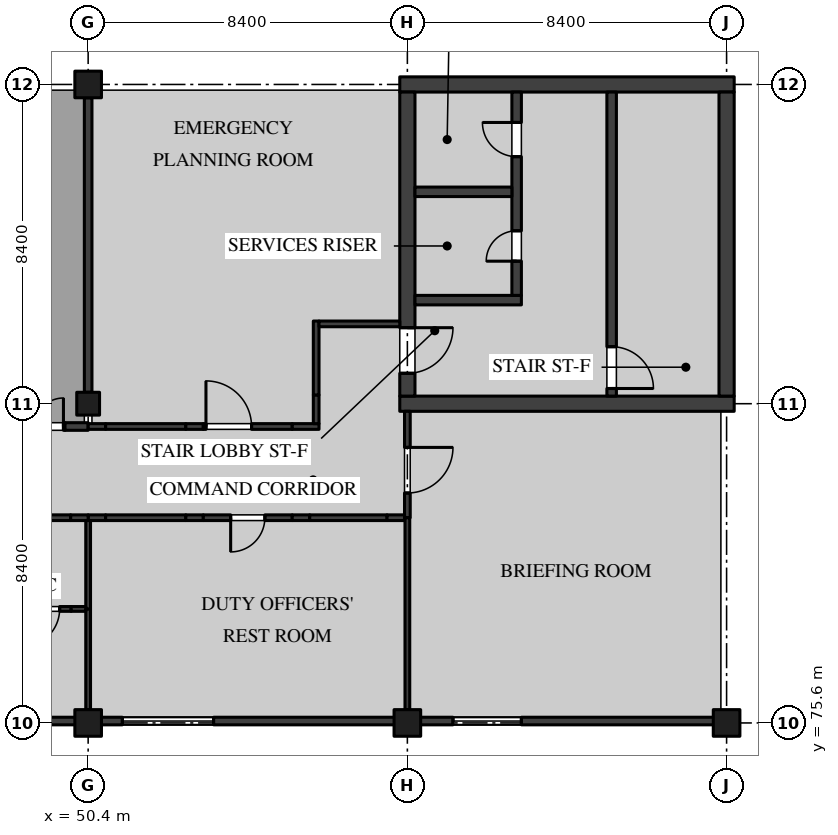
"""IFC4 building model, lengths in metres.
Left out: names, types, materials, properties, quantities, classifications, styles, units other than length and angle.
Written with IfcOpenShell. Run it as: python <this file> out.ifc"""

import sys

from ifc_helpers import new_model, si_unit, direction, frame, frame_2d, origin, origin_2d, place, context, subcontext, project, spatial, rectangle, extrude, element, fill, save


model = new_model("IFC4")
c1 = context("Model", 3, precision=1e-05, world=origin(), true_north=direction((0.0, 1.0)))
c2 = subcontext(c1, "Body", "Model", "MODEL_VIEW")
j1 = project(units=[si_unit("LENGTHUNIT", "METRE"), si_unit("PLANEANGLEUNIT", "RADIAN")], contexts=[c1])
p1 = place(None, origin())
s1 = spatial("IfcSite", under=j1, at=p1, CompositionType="ELEMENT")
p2 = place(p1, origin())
s2 = spatial("IfcBuilding", under=s1, at=p2, CompositionType="ELEMENT")
p3 = place(p2, frame((0.0, 0.0, 5.4)))
s3 = spatial("IfcBuildingStorey", under=s2, at=p3, CompositionType="ELEMENT", Elevation=5.4)
p4 = place(p3, frame((50.4, 75.6, 0.0), z_axis=(0.0, 0.0, 1.0), x_axis=(1.0, 0.0, 0.0)))
e1 = element("IfcColumn", 1, at=p4, inside=s3, PredefinedType="COLUMN", context=c2, shape_type="SweptSolid", body=[
    extrude(rectangle(XDim=0.7, YDim=0.7, at=origin_2d()), origin(), (0.0, 0.0, 1.0), 4.37),
])
p5 = place(p3, frame((50.4, 84.0, 0.0), z_axis=(0.0, 0.0, 1.0), x_axis=(1.0, 0.0, 0.0)))
e2 = element("IfcColumn", 2, at=p5, inside=s3, PredefinedType="COLUMN", context=c2, shape_type="SweptSolid", body=[
    extrude(rectangle(XDim=0.6, YDim=0.6, at=origin_2d()), origin(), (0.0, 0.0, 1.0), 4.37),
])
for number, where, z_axis, x_axis in (
    (3, (50.4, 92.4, 0.0), (0.0, 0.0, 1.0), (1.0, 0.0, 0.0)),
    (4, (58.8, 75.6, 0.0), (0.0, 0.0, 1.0), (1.0, 0.0, 0.0)),
    (5, (67.2, 75.6, 0.0), (0.0, 0.0, 1.0), (1.0, 0.0, 0.0)),
):
    element("IfcColumn", number, at=place(p3, frame(where, z_axis=z_axis, x_axis=x_axis)), inside=s3, PredefinedType="COLUMN", context=c2, shape_type="SweptSolid", body=[
        extrude(rectangle(XDim=0.7, YDim=0.7, at=origin_2d()), origin(), (0.0, 0.0, 1.0), 4.37),
    ])
for number, where, z_axis, x_axis in (
    (6, (58.6, 84.0, 0.0), (0.0, 0.0, 1.0), (1.0, 0.0, 0.0)),
    (7, (58.6, 92.4, 0.0), (0.0, 0.0, 1.0), (1.0, 0.0, 0.0)),
):
    element("IfcWall", number, at=place(p3, frame(where, z_axis=z_axis, x_axis=x_axis)), inside=s3, PredefinedType="SHEAR", context=c2, shape_type="SweptSolid", body=[
        extrude(rectangle(XDim=8.8, YDim=0.4, at=frame_2d((4.4, 0.0))), origin(), (0.0, 0.0, 1.0), 4.37),
    ])
p6 = place(p3, frame((58.8, 84.2, 0.0), z_axis=(0.0, 0.0, 1.0), x_axis=(0.0, 1.0, 0.0)))
e8 = element("IfcWall", 8, at=p6, inside=s3, PredefinedType="SHEAR", context=c2, shape_type="SweptSolid", body=[
    extrude(rectangle(XDim=8.0, YDim=0.4, at=frame_2d((4.0, 0.0))), origin(), (0.0, 0.0, 1.0), 4.37),
])
p7 = place(p6, frame((0.6, 0.0, 0.0)))
e9 = element("IfcOpeningElement", 9, at=p7, cuts=e8, PredefinedType="OPENING", context=c2, shape_type="SweptSolid", body=[
    extrude(rectangle(XDim=1.2, YDim=2.1, at=frame_2d((0.6, 1.05))), frame((0.0, 0.21, 0.0), z_axis=(0.0, -1.0, 0.0), x_axis=(1.0, 0.0, 0.0)), (0.0, 0.0, 1.0), 0.42),
])
p8 = place(p3, frame((67.2, 84.2, 0.0), z_axis=(0.0, 0.0, 1.0), x_axis=(0.0, 1.0, 0.0)))
e10 = element("IfcWall", 10, at=p8, inside=s3, PredefinedType="SHEAR", context=c2, shape_type="SweptSolid", body=[
    extrude(rectangle(XDim=8.0, YDim=0.4, at=frame_2d((4.0, 0.0))), origin(), (0.0, 0.0, 1.0), 4.37),
])
p9 = place(p3, frame((64.175, 84.2, 0.0), z_axis=(0.0, 0.0, 1.0), x_axis=(0.0, 1.0, 0.0)))
e11 = element("IfcWall", 11, at=p9, inside=s3, PredefinedType="SOLIDWALL", context=c2, shape_type="SweptSolid", body=[
    extrude(rectangle(XDim=8.0, YDim=0.25, at=frame_2d((4.0, 0.0))), origin(), (0.0, 0.0, 1.0), 4.37),
])
p10 = place(p9, frame((0.2, 0.0, 0.0)))
e12 = element("IfcOpeningElement", 12, at=p10, cuts=e11, PredefinedType="OPENING", context=c2, shape_type="SweptSolid", body=[
    extrude(rectangle(XDim=1.1, YDim=2.1, at=frame_2d((0.55, 1.05))), frame((0.0, 0.135, 0.0), z_axis=(0.0, -1.0, 0.0), x_axis=(1.0, 0.0, 0.0)), (0.0, 0.0, 1.0), 0.27),
])
p11 = place(p3, frame((61.8, 86.725, 0.0), z_axis=(0.0, 0.0, 1.0), x_axis=(-1.0, 0.0, 0.0)))
e13 = element("IfcWall", 13, at=p11, inside=s3, PredefinedType="SOLIDWALL", context=c2, shape_type="SweptSolid", body=[
    extrude(rectangle(XDim=2.8, YDim=0.25, at=frame_2d((1.4, 0.0))), origin(), (0.0, 0.0, 1.0), 4.37),
])
p12 = place(p3, frame((61.675, 86.85, 0.0), z_axis=(0.0, 0.0, 1.0), x_axis=(0.0, 1.0, 0.0)))
e14 = element("IfcWall", 14, at=p12, inside=s3, PredefinedType="SOLIDWALL", context=c2, shape_type="SweptSolid", body=[
    extrude(rectangle(XDim=5.35, YDim=0.25, at=frame_2d((2.675, 0.0))), origin(), (0.0, 0.0, 1.0), 4.37),
])
p13 = place(p12, frame((3.65, 0.0, 0.0)))
e15 = element("IfcOpeningElement", 15, at=p13, cuts=e14, PredefinedType="OPENING", context=c2, shape_type="SweptSolid", body=[
    extrude(rectangle(XDim=0.9, YDim=2.1, at=frame_2d((0.45, 1.05))), frame((0.0, 0.135, 0.0), z_axis=(0.0, -1.0, 0.0), x_axis=(1.0, 0.0, 0.0)), (0.0, 0.0, 1.0), 0.27),
])
p14 = place(p12, frame((0.9, 0.0, 0.0)))
e16 = element("IfcOpeningElement", 16, at=p14, cuts=e14, PredefinedType="OPENING", context=c2, shape_type="SweptSolid", body=[
    extrude(rectangle(XDim=0.8, YDim=2.1, at=frame_2d((0.4, 1.05))), frame((0.0, 0.135, 0.0), z_axis=(0.0, -1.0, 0.0), x_axis=(1.0, 0.0, 0.0)), (0.0, 0.0, 1.0), 0.27),
])
p15 = place(p3, frame((61.55, 89.575, 0.0), z_axis=(0.0, 0.0, 1.0), x_axis=(-1.0, 0.0, 0.0)))
e17 = element("IfcWall", 17, at=p15, inside=s3, PredefinedType="SOLIDWALL", context=c2, shape_type="SweptSolid", body=[
    extrude(rectangle(XDim=2.55, YDim=0.25, at=frame_2d((1.275, 0.0))), origin(), (0.0, 0.0, 1.0), 4.37),
])
p16 = place(p3, frame((58.8, 81.0, 0.0), z_axis=(0.0, 0.0, 1.0), x_axis=(0.0, 1.0, 0.0)))
e18 = element("IfcWall", 18, at=p16, inside=s3, PredefinedType="PARTITIONING", context=c2, shape_type="SweptSolid", body=[
    extrude(rectangle(XDim=2.8, YDim=0.15, at=frame_2d((1.4, 0.0))), origin(), (0.0, 0.0, 1.0), 3.746),
])
p17 = place(p16, frame((0.65, 0.0, 0.0)))
e19 = element("IfcOpeningElement", 19, at=p17, cuts=e18, PredefinedType="OPENING", context=c2, shape_type="SweptSolid", body=[
    extrude(rectangle(XDim=1.2, YDim=2.4, at=frame_2d((0.6, 1.2))), frame((0.0, 0.085, 0.0), z_axis=(0.0, -1.0, 0.0), x_axis=(1.0, 0.0, 0.0)), (0.0, 0.0, 1.0), 0.17),
])
p18 = place(p3, frame((58.8, 75.95, 0.0), z_axis=(0.0, 0.0, 1.0), x_axis=(0.0, 1.0, 0.0)))
e20 = element("IfcWall", 20, at=p18, inside=s3, PredefinedType="PARTITIONING", context=c2, shape_type="SweptSolid", body=[
    extrude(rectangle(XDim=5.05, YDim=0.125, at=frame_2d((2.525, 0.0))), origin(), (0.0, 0.0, 1.0), 3.746),
])
p19 = place(p3, frame((47.905, 83.4, 0.0), z_axis=(0.0, 0.0, 1.0), x_axis=(1.0, 0.0, 0.0)))
e21 = element("IfcWall", 21, at=p19, inside=s3, PredefinedType="PARTITIONING", context=c2, shape_type="SweptSolid", body=[
    extrude(rectangle(XDim=1.885, YDim=0.2, at=frame_2d((0.942, 0.0))), origin(), (0.0, 0.0, 1.0), 4.37),
])
p20 = place(p19, frame((0.345, 0.0, 0.0)))
e22 = element("IfcOpeningElement", 22, at=p20, cuts=e21, PredefinedType="OPENING", context=c2, shape_type="SweptSolid", body=[
    extrude(rectangle(XDim=1.5, YDim=2.1, at=frame_2d((0.75, 1.05))), frame((0.0, 0.11, 0.0), z_axis=(0.0, -1.0, 0.0), x_axis=(1.0, 0.0, 0.0)), (0.0, 0.0, 1.0), 0.22),
])
p21 = place(p3, frame((49.79, 83.4, 0.0), z_axis=(0.0, 0.0, 1.0), x_axis=(1.0, 0.0, 0.0)))
e23 = element("IfcWall", 23, at=p21, inside=s3, PredefinedType="PARTITIONING", context=c2, shape_type="SweptSolid", body=[
    extrude(rectangle(XDim=0.61, YDim=0.2, at=frame_2d((0.305, 0.0))), origin(), (0.0, 0.0, 1.0), 3.746),
])
p22 = place(p3, frame((50.4, 81.0, 0.0), z_axis=(0.0, 0.0, 1.0), x_axis=(1.0, 0.0, 0.0)))
e24 = element("IfcWall", 24, at=p22, inside=s3, PredefinedType="PARTITIONING", context=c2, shape_type="SweptSolid", body=[
    extrude(rectangle(XDim=0.46, YDim=0.15, at=frame_2d((0.23, 0.0))), origin(), (0.0, 0.0, 1.0), 3.746),
])
p23 = place(p3, frame((50.86, 81.0, 0.0), z_axis=(0.0, 0.0, 1.0), x_axis=(1.0, 0.0, 0.0)))
e25 = element("IfcWall", 25, at=p23, inside=s3, PredefinedType="PARTITIONING", context=c2, shape_type="SweptSolid", body=[
    extrude(rectangle(XDim=2.11, YDim=0.15, at=frame_2d((1.055, 0.0))), origin(), (0.0, 0.0, 1.0), 4.37),
])
p24 = place(p3, frame((52.97, 81.0, 0.0), z_axis=(0.0, 0.0, 1.0), x_axis=(1.0, 0.0, 0.0)))
e26 = element("IfcWall", 26, at=p24, inside=s3, PredefinedType="PARTITIONING", context=c2, shape_type="SweptSolid", body=[
    extrude(rectangle(XDim=0.46, YDim=0.15, at=frame_2d((0.23, 0.0))), origin(), (0.0, 0.0, 1.0), 3.895),
])
p25 = place(p3, frame((53.43, 81.0, 0.0), z_axis=(0.0, 0.0, 1.0), x_axis=(1.0, 0.0, 0.0)))
e27 = element("IfcWall", 27, at=p25, inside=s3, PredefinedType="PARTITIONING", context=c2, shape_type="SweptSolid", body=[
    extrude(rectangle(XDim=2.34, YDim=0.15, at=frame_2d((1.17, 0.0))), origin(), (0.0, 0.0, 1.0), 4.37),
])
p26 = place(p25, frame((0.72, 0.0, 0.0)))
e28 = element("IfcOpeningElement", 28, at=p26, cuts=e27, PredefinedType="OPENING", context=c2, shape_type="SweptSolid", body=[
    extrude(rectangle(XDim=0.9, YDim=2.1, at=frame_2d((0.45, 1.05))), frame((0.0, 0.085, 0.0), z_axis=(0.0, -1.0, 0.0), x_axis=(1.0, 0.0, 0.0)), (0.0, 0.0, 1.0), 0.17),
])
p27 = place(p3, frame((55.77, 81.0, 0.0), z_axis=(0.0, 0.0, 1.0), x_axis=(1.0, 0.0, 0.0)))
e29 = element("IfcWall", 29, at=p27, inside=s3, PredefinedType="PARTITIONING", context=c2, shape_type="SweptSolid", body=[
    extrude(rectangle(XDim=0.46, YDim=0.15, at=frame_2d((0.23, 0.0))), origin(), (0.0, 0.0, 1.0), 3.895),
])
p28 = place(p3, frame((56.23, 81.0, 0.0), z_axis=(0.0, 0.0, 1.0), x_axis=(1.0, 0.0, 0.0)))
e30 = element("IfcWall", 30, at=p28, inside=s3, PredefinedType="PARTITIONING", context=c2, shape_type="SweptSolid", body=[
    extrude(rectangle(XDim=2.035, YDim=0.15, at=frame_2d((1.018, 0.0))), origin(), (0.0, 0.0, 1.0), 4.37),
])
for number, where, z_axis, x_axis in (
    (31, (58.265, 81.0, 0.0), (0.0, 0.0, 1.0), (1.0, 0.0, 0.0)),
    (32, (50.4, 83.4, 0.0), (0.0, 0.0, 1.0), (1.0, 0.0, 0.0)),
):
    element("IfcWall", number, at=place(p3, frame(where, z_axis=z_axis, x_axis=x_axis)), inside=s3, PredefinedType="PARTITIONING", context=c2, shape_type="SweptSolid", body=[
        extrude(rectangle(XDim=0.46, YDim=0.15, at=frame_2d((0.23, 0.0))), origin(), (0.0, 0.0, 1.0), 3.746),
    ])
p29 = place(p3, frame((50.86, 83.4, 0.0), z_axis=(0.0, 0.0, 1.0), x_axis=(1.0, 0.0, 0.0)))
e33 = element("IfcWall", 33, at=p29, inside=s3, PredefinedType="PARTITIONING", context=c2, shape_type="SweptSolid", body=[
    extrude(rectangle(XDim=2.11, YDim=0.15, at=frame_2d((1.055, 0.0))), origin(), (0.0, 0.0, 1.0), 4.37),
])
p30 = place(p3, frame((52.97, 83.4, 0.0), z_axis=(0.0, 0.0, 1.0), x_axis=(1.0, 0.0, 0.0)))
e34 = element("IfcWall", 34, at=p30, inside=s3, PredefinedType="PARTITIONING", context=c2, shape_type="SweptSolid", body=[
    extrude(rectangle(XDim=0.46, YDim=0.15, at=frame_2d((0.23, 0.0))), origin(), (0.0, 0.0, 1.0), 3.895),
])
p31 = place(p3, frame((53.43, 83.4, 0.0), z_axis=(0.0, 0.0, 1.0), x_axis=(1.0, 0.0, 0.0)))
e35 = element("IfcWall", 35, at=p31, inside=s3, PredefinedType="PARTITIONING", context=c2, shape_type="SweptSolid", body=[
    extrude(rectangle(XDim=2.34, YDim=0.15, at=frame_2d((1.17, 0.0))), origin(), (0.0, 0.0, 1.0), 4.37),
])
p32 = place(p31, frame((0.07, 0.0, 0.0)))
e36 = element("IfcOpeningElement", 36, at=p32, cuts=e35, PredefinedType="OPENING", context=c2, shape_type="SweptSolid", body=[
    extrude(rectangle(XDim=1.2, YDim=2.4, at=frame_2d((0.6, 1.2))), frame((0.0, 0.085, 0.0), z_axis=(0.0, -1.0, 0.0), x_axis=(1.0, 0.0, 0.0)), (0.0, 0.0, 1.0), 0.17),
])
p33 = place(p3, frame((55.77, 83.4, 0.0), z_axis=(0.0, 0.0, 1.0), x_axis=(1.0, 0.0, 0.0)))
e37 = element("IfcWall", 37, at=p33, inside=s3, PredefinedType="PARTITIONING", context=c2, shape_type="SweptSolid", body=[
    extrude(rectangle(XDim=0.705, YDim=0.15, at=frame_2d((0.353, 0.0))), origin(), (0.0, 0.0, 1.0), 3.895),
])
p34 = place(p3, frame((56.4, 83.475, 0.0), z_axis=(0.0, 0.0, 1.0), x_axis=(0.0, 1.0, 0.0)))
e38 = element("IfcWall", 38, at=p34, inside=s3, PredefinedType="PARTITIONING", context=c2, shape_type="SweptSolid", body=[
    extrude(rectangle(XDim=0.755, YDim=0.15, at=frame_2d((0.377, 0.0))), origin(), (0.0, 0.0, 1.0), 3.746),
])
p35 = place(p3, frame((56.4, 84.23, 0.0), z_axis=(0.0, 0.0, 1.0), x_axis=(0.0, 1.0, 0.0)))
e39 = element("IfcWall", 39, at=p35, inside=s3, PredefinedType="PARTITIONING", context=c2, shape_type="SweptSolid", body=[
    extrude(rectangle(XDim=1.945, YDim=0.15, at=frame_2d((0.973, 0.0))), origin(), (0.0, 0.0, 1.0), 4.37),
])
p36 = place(p3, frame((56.475, 86.1, 0.0), z_axis=(0.0, 0.0, 1.0), x_axis=(1.0, 0.0, 0.0)))
e40 = element("IfcWall", 40, at=p36, inside=s3, PredefinedType="PARTITIONING", context=c2, shape_type="SweptSolid", body=[
    extrude(rectangle(XDim=2.125, YDim=0.15, at=frame_2d((1.062, 0.0))), origin(), (0.0, 0.0, 1.0), 4.37),
])
p37 = place(p3, frame((47.83, 81.0, 0.0), z_axis=(0.0, 0.0, 1.0), x_axis=(1.0, 0.0, 0.0)))
e41 = element("IfcWall", 41, at=p37, inside=s3, PredefinedType="PARTITIONING", context=c2, shape_type="SweptSolid", body=[
    extrude(rectangle(XDim=2.11, YDim=0.15, at=frame_2d((1.055, 0.0))), origin(), (0.0, 0.0, 1.0), 4.37),
])
p38 = place(p3, frame((49.94, 81.0, 0.0), z_axis=(0.0, 0.0, 1.0), x_axis=(1.0, 0.0, 0.0)))
e42 = element("IfcWall", 42, at=p38, inside=s3, PredefinedType="PARTITIONING", context=c2, shape_type="SweptSolid", body=[
    extrude(rectangle(XDim=0.46, YDim=0.15, at=frame_2d((0.23, 0.0))), origin(), (0.0, 0.0, 1.0), 3.746),
])
p39 = place(p3, frame((50.4, 84.3, 0.0), z_axis=(0.0, 0.0, 1.0), x_axis=(0.0, 1.0, 0.0)))
e43 = element("IfcWall", 43, at=p39, inside=s3, PredefinedType="PARTITIONING", context=c2, shape_type="SweptSolid", body=[
    extrude(rectangle(XDim=7.75, YDim=0.2, at=frame_2d((3.875, 0.0))), origin(), (0.0, 0.0, 1.0), 3.746),
])
p40 = place(p3, frame((50.4, 75.95, 0.0), z_axis=(0.0, 0.0, 1.0), x_axis=(0.0, 1.0, 0.0)))
e44 = element("IfcWall", 44, at=p40, inside=s3, PredefinedType="PARTITIONING", context=c2, shape_type="SweptSolid", body=[
    extrude(rectangle(XDim=2.65, YDim=0.125, at=frame_2d((1.325, 0.0))), origin(), (0.0, 0.0, 1.0), 3.746),
])
p41 = place(p3, frame((50.4, 78.6, 0.0), z_axis=(0.0, 0.0, 1.0), x_axis=(0.0, 1.0, 0.0)))
e45 = element("IfcWall", 45, at=p41, inside=s3, PredefinedType="PARTITIONING", context=c2, shape_type="SweptSolid", body=[
    extrude(rectangle(XDim=2.325, YDim=0.125, at=frame_2d((1.163, 0.0))), origin(), (0.0, 0.0, 1.0), 3.746),
])
p42 = place(p3, frame((48.0, 78.6, 0.0), z_axis=(0.0, 0.0, 1.0), x_axis=(1.0, 0.0, 0.0)))
e46 = element("IfcWall", 46, at=p42, inside=s3, PredefinedType="PARTITIONING", context=c2, shape_type="SweptSolid", body=[
    extrude(rectangle(XDim=1.952, YDim=0.125, at=frame_2d((0.976, 0.0))), origin(), (0.0, 0.0, 1.0), 4.37),
])
p43 = place(p42, frame((0.65, 0.0, 0.0)))
e47 = element("IfcOpeningElement", 47, at=p43, cuts=e46, PredefinedType="OPENING", context=c2, shape_type="SweptSolid", body=[
    extrude(rectangle(XDim=1.0, YDim=2.1, at=frame_2d((0.5, 1.05))), frame((0.0, 0.073, 0.0), z_axis=(0.0, -1.0, 0.0), x_axis=(1.0, 0.0, 0.0)), (0.0, 0.0, 1.0), 0.145),
])
p44 = place(p3, frame((49.952, 78.6, 0.0), z_axis=(0.0, 0.0, 1.0), x_axis=(1.0, 0.0, 0.0)))
e48 = element("IfcWall", 48, at=p44, inside=s3, PredefinedType="PARTITIONING", context=c2, shape_type="SweptSolid", body=[
    extrude(rectangle(XDim=0.385, YDim=0.125, at=frame_2d((0.192, 0.0))), origin(), (0.0, 0.0, 1.0), 3.746),
])
p45 = place(p3, frame((42.2, 75.65, 0.0), z_axis=(0.0, 0.0, 1.0), x_axis=(1.0, 0.0, 0.0)))
e49 = element("IfcWall", 49, at=p45, inside=s3, PredefinedType="SOLIDWALL", context=c2, shape_type="SweptSolid", body=[
    extrude(rectangle(XDim=7.87, YDim=0.2, at=frame_2d((3.935, 0.0))), origin(), (0.0, 0.0, 1.0), 3.746),
])
p46 = place(p3, frame((50.73, 75.65, 0.0), z_axis=(0.0, 0.0, 1.0), x_axis=(1.0, 0.0, 0.0)))
e50 = element("IfcWall", 50, at=p46, inside=s3, PredefinedType="SOLIDWALL", context=c2, shape_type="SweptSolid", body=[
    extrude(rectangle(XDim=7.74, YDim=0.2, at=frame_2d((3.87, 0.0))), origin(), (0.0, 0.0, 1.0), 3.746),
])
p47 = place(p46, frame((0.57, 0.0, 0.9)))
e51 = element("IfcOpeningElement", 51, at=p47, cuts=e50, PredefinedType="OPENING", context=c2, shape_type="SweptSolid", body=[
    extrude(rectangle(XDim=2.4, YDim=2.1, at=frame_2d((1.2, 1.05))), frame((0.0, 0.11, 0.0), z_axis=(0.0, -1.0, 0.0), x_axis=(1.0, 0.0, 0.0)), (0.0, 0.0, 1.0), 0.22),
])
p48 = place(p3, frame((59.13, 75.65, 0.0), z_axis=(0.0, 0.0, 1.0), x_axis=(1.0, 0.0, 0.0)))
e52 = element("IfcWall", 52, at=p48, inside=s3, PredefinedType="SOLIDWALL", context=c2, shape_type="SweptSolid", body=[
    extrude(rectangle(XDim=7.74, YDim=0.2, at=frame_2d((3.87, 0.0))), origin(), (0.0, 0.0, 1.0), 3.746),
])
p49 = place(p48, frame((0.87, 0.0, 0.9)))
e53 = element("IfcOpeningElement", 53, at=p49, cuts=e52, PredefinedType="OPENING", context=c2, shape_type="SweptSolid", body=[
    extrude(rectangle(XDim=1.8, YDim=2.1, at=frame_2d((0.9, 1.05))), frame((0.0, 0.11, 0.0), z_axis=(0.0, -1.0, 0.0), x_axis=(1.0, 0.0, 0.0)), (0.0, 0.0, 1.0), 0.22),
])
p50 = place(p13, origin())
e54 = element("IfcDoor", 54, at=p50, inside=s3, OperationType="SINGLE_SWING_LEFT", PredefinedType="DOOR", context=c2, shape_type="SweptSolid", body=[
    extrude(rectangle(XDim=0.9, YDim=2.1, at=frame_2d((0.45, 1.05))), frame((0.0, 0.035, 0.0), z_axis=(0.0, -1.0, 0.0), x_axis=(1.0, 0.0, 0.0)), (0.0, 0.0, 1.0), 0.07),
])
fill(e15, e54)
p51 = place(p7, frame((1.2, 0.0, 0.0), z_axis=(0.0, 0.0, 1.0), x_axis=(-1.0, 0.0, 0.0)))
e55 = element("IfcDoor", 55, at=p51, inside=s3, OperationType="SINGLE_SWING_RIGHT", PredefinedType="DOOR", context=c2, shape_type="SweptSolid", body=[
    extrude(rectangle(XDim=1.2, YDim=2.1, at=frame_2d((0.6, 1.05))), frame((0.0, 0.035, 0.0), z_axis=(0.0, -1.0, 0.0), x_axis=(1.0, 0.0, 0.0)), (0.0, 0.0, 1.0), 0.07),
])
fill(e9, e55)
p52 = place(p14, origin())
e56 = element("IfcDoor", 56, at=p52, inside=s3, OperationType="SINGLE_SWING_RIGHT", PredefinedType="DOOR", context=c2, shape_type="SweptSolid", body=[
    extrude(rectangle(XDim=0.8, YDim=2.1, at=frame_2d((0.4, 1.05))), frame((0.0, 0.035, 0.0), z_axis=(0.0, -1.0, 0.0), x_axis=(1.0, 0.0, 0.0)), (0.0, 0.0, 1.0), 0.07),
])
fill(e16, e56)
p53 = place(p10, frame((1.1, 0.0, 0.0), z_axis=(0.0, 0.0, 1.0), x_axis=(-1.0, 0.0, 0.0)))
e57 = element("IfcDoor", 57, at=p53, inside=s3, OperationType="SINGLE_SWING_LEFT", PredefinedType="DOOR", context=c2, shape_type="SweptSolid", body=[
    extrude(rectangle(XDim=1.1, YDim=2.1, at=frame_2d((0.55, 1.05))), frame((0.0, 0.035, 0.0), z_axis=(0.0, -1.0, 0.0), x_axis=(1.0, 0.0, 0.0)), (0.0, 0.0, 1.0), 0.07),
])
fill(e12, e57)
p54 = place(p17, frame((1.2, 0.0, 0.0), z_axis=(0.0, 0.0, 1.0), x_axis=(-1.0, 0.0, 0.0)))
e58 = element("IfcDoor", 58, at=p54, inside=s3, OperationType="SINGLE_SWING_RIGHT", PredefinedType="DOOR", context=c2, shape_type="SweptSolid", body=[
    extrude(rectangle(XDim=1.2, YDim=2.4, at=frame_2d((0.6, 1.2))), frame((0.0, 0.025, 0.0), z_axis=(0.0, -1.0, 0.0), x_axis=(1.0, 0.0, 0.0)), (0.0, 0.0, 1.0), 0.05),
])
fill(e19, e58)
p55 = place(p20, origin())
e59 = element("IfcDoor", 59, at=p55, inside=s3, OperationType="DOUBLE_DOOR_SINGLE_SWING", PredefinedType="DOOR", context=c2, shape_type="SweptSolid", body=[
    extrude(rectangle(XDim=1.5, YDim=2.1, at=frame_2d((0.75, 1.05))), frame((0.0, 0.03, 0.0), z_axis=(0.0, -1.0, 0.0), x_axis=(1.0, 0.0, 0.0)), (0.0, 0.0, 1.0), 0.06),
])
fill(e22, e59)
p56 = place(p26, frame((0.9, 0.0, 0.0), z_axis=(0.0, 0.0, 1.0), x_axis=(-1.0, 0.0, 0.0)))
e60 = element("IfcDoor", 60, at=p56, inside=s3, OperationType="SINGLE_SWING_LEFT", PredefinedType="DOOR", context=c2, shape_type="SweptSolid", body=[
    extrude(rectangle(XDim=0.9, YDim=2.1, at=frame_2d((0.45, 1.05))), frame((0.0, 0.025, 0.0), z_axis=(0.0, -1.0, 0.0), x_axis=(1.0, 0.0, 0.0)), (0.0, 0.0, 1.0), 0.05),
])
fill(e28, e60)
p57 = place(p32, origin())
e61 = element("IfcDoor", 61, at=p57, inside=s3, OperationType="SINGLE_SWING_RIGHT", PredefinedType="DOOR", context=c2, shape_type="SweptSolid", body=[
    extrude(rectangle(XDim=1.2, YDim=2.4, at=frame_2d((0.6, 1.2))), frame((0.0, 0.025, 0.0), z_axis=(0.0, -1.0, 0.0), x_axis=(1.0, 0.0, 0.0)), (0.0, 0.0, 1.0), 0.05),
])
fill(e36, e61)
p58 = place(p43, frame((1.0, 0.0, 0.0), z_axis=(0.0, 0.0, 1.0), x_axis=(-1.0, 0.0, 0.0)))
e62 = element("IfcDoor", 62, at=p58, inside=s3, OperationType="SINGLE_SWING_LEFT", PredefinedType="DOOR", context=c2, shape_type="SweptSolid", body=[
    extrude(rectangle(XDim=1.0, YDim=2.1, at=frame_2d((0.5, 1.05))), frame((0.0, 0.02, 0.0), z_axis=(0.0, -1.0, 0.0), x_axis=(1.0, 0.0, 0.0)), (0.0, 0.0, 1.0), 0.04),
])
fill(e47, e62)
p59 = place(p47, origin())
e63 = element("IfcWindow", 63, at=p59, inside=s3, PartitioningType="SINGLE_PANEL", PredefinedType="WINDOW", context=c2, shape_type="SweptSolid", body=[
    extrude(rectangle(XDim=2.4, YDim=2.1, at=frame_2d((1.2, 1.05))), frame((0.0, 0.04, 0.0), z_axis=(0.0, -1.0, 0.0), x_axis=(1.0, 0.0, 0.0)), (0.0, 0.0, 1.0), 0.08),
])
fill(e51, e63)
p60 = place(p49, origin())
e64 = element("IfcWindow", 64, at=p60, inside=s3, PartitioningType="SINGLE_PANEL", PredefinedType="WINDOW", context=c2, shape_type="SweptSolid", body=[
    extrude(rectangle(XDim=1.8, YDim=2.1, at=frame_2d((0.9, 1.05))), frame((0.0, 0.04, 0.0), z_axis=(0.0, -1.0, 0.0), x_axis=(1.0, 0.0, 0.0)), (0.0, 0.0, 1.0), 0.08),
])
fill(e53, e64)
save(model, sys.argv[1])
